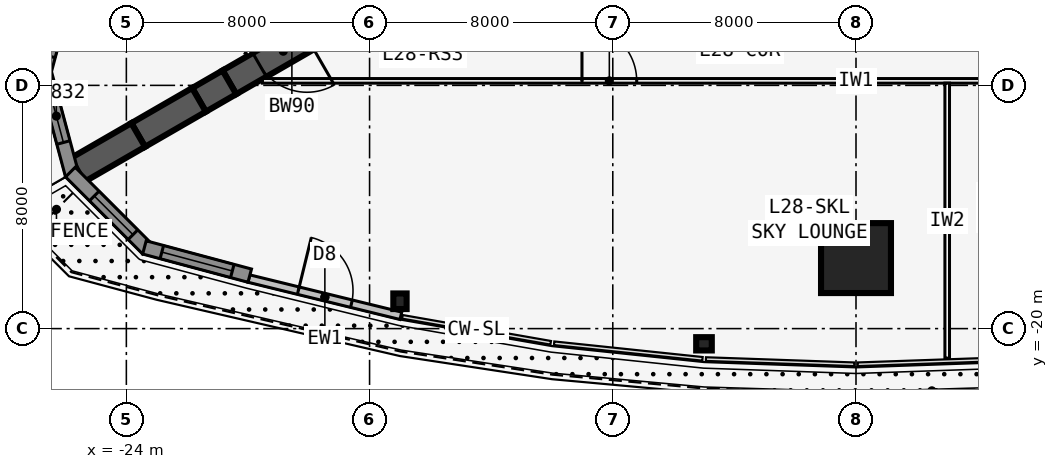
"""IFC4 building model, lengths in metres.
Left out: names, types, materials, properties, quantities, classifications, styles, units other than length and angle.
Written with IfcOpenShell. Run it as: python <this file> out.ifc"""

import sys

from ifc_helpers import new_model, si_unit, direction, frame, frame_2d, origin, origin_2d, place, context, subcontext, project, spatial, polyline, rectangle, i_section, outline, extrude, element, fill, save


model = new_model("IFC4")
c1 = context("Model", 3, precision=1e-05, world=origin(), true_north=direction((0.0, 1.0)))
c2 = subcontext(c1, "Body", "Model", "MODEL_VIEW")
j1 = project(units=[si_unit("LENGTHUNIT", "METRE"), si_unit("PLANEANGLEUNIT", "RADIAN")], contexts=[c1])
p1 = place(None, origin())
s1 = spatial("IfcSite", under=j1, at=p1, CompositionType="ELEMENT")
p2 = place(p1, origin())
s2 = spatial("IfcBuilding", under=s1, at=p2, CompositionType="ELEMENT")
p3 = place(p2, frame((0.0, 0.0, 109.7)))
s3 = spatial("IfcBuildingStorey", under=s2, at=p3, CompositionType="ELEMENT", Elevation=109.7)
p4 = place(p3, frame((-16.5, -9.526, 0.0), z_axis=(0.0, 0.0, 1.0), x_axis=(-0.866031398331, -0.499989616998, 0.0)))
e1 = element("IfcWall", 1, at=p4, inside=s3, PredefinedType="SHEAR", context=c2, shape_type="SweptSolid", body=[
    extrude(rectangle(XDim=4.746, YDim=0.9, at=frame_2d((2.373, 0.0))), origin(), (0.0, 0.0, 1.0), 5.0),
])
p5 = place(p4, frame((1.8, 0.0, 0.0)))
e2 = element("IfcOpeningElement", 2, at=p5, cuts=e1, PredefinedType="OPENING", context=c2, shape_type="SweptSolid", body=[
    extrude(rectangle(XDim=1.8, YDim=2.13, at=frame_2d((0.9, 1.065))), frame((0.0, 0.46, 0.0), z_axis=(0.0, -1.0, 0.0), x_axis=(1.0, 0.0, 0.0)), (0.0, 0.0, 1.0), 0.92),
])
p6 = place(p3, frame((-20.61, -11.899, 0.0), z_axis=(0.0, 0.0, 1.0), x_axis=(-0.866009537788, -0.500027479704, 0.0)))
e3 = element("IfcWall", 3, at=p6, inside=s3, PredefinedType="SHEAR", context=c2, shape_type="SweptSolid", body=[
    extrude(rectangle(XDim=1.155, YDim=0.9, at=frame_2d((0.577, 0.0))), origin(), (0.0, 0.0, 1.0), 5.0),
])
for number, where, z_axis, x_axis in (
    (4, (-21.61, -12.477, 0.0), (0.0, 0.0, 1.0), (-0.866, -0.5, 0.0)),
    (5, (-23.61, -13.631, 0.0), (0.0, 0.0, 1.0), (-0.866, -0.5, 0.0)),
):
    element("IfcWall", number, at=place(p3, frame(where, z_axis=z_axis, x_axis=x_axis)), inside=s3, PredefinedType="SHEAR", context=c2, shape_type="SweptSolid", body=[
        extrude(rectangle(XDim=2.309, YDim=0.9, at=frame_2d((1.155, 0.0))), origin(), (0.0, 0.0, 1.0), 5.0),
    ])
for number, where, z_axis, x_axis in (
    (6, (-15.0, -19.1, 0.0), (0.0, 0.0, 1.0), (1.0, 0.0, 0.0)),
    (7, (-5.0, -20.5, 0.0), (0.0, 0.0, 1.0), (0.0, -1.0, 0.0)),
):
    element("IfcColumn", number, at=place(p3, frame(where, z_axis=z_axis, x_axis=x_axis)), inside=s3, PredefinedType="COLUMN", context=c2, shape_type="SweptSolid", body=[
        extrude(i_section(OverallWidth=0.437, OverallDepth=0.513, WebThickness=0.061, FlangeThickness=0.097, at=origin_2d()), origin(), (0.0, 0.0, 1.0), 5.0),
    ])
p7 = place(p3, frame((0.0, -17.68, 0.0), z_axis=(0.0, 0.0, 1.0), x_axis=(0.0, -1.0, 0.0)))
e8 = element("IfcColumn", 8, at=p7, inside=s3, PredefinedType="COLUMN", context=c2, shape_type="SweptSolid", body=[
    extrude(rectangle(XDim=2.3, YDim=2.3, at=origin_2d()), origin(), (0.0, 0.0, 1.0), 5.0),
])
p8 = place(p3, frame((-19.97, -18.354, 0.0), z_axis=(0.0, 0.0, 1.0), x_axis=(0.971270024053, -0.237980126011, 0.0)))
e9 = element("IfcWall", 9, at=p8, inside=s3, PredefinedType="STANDARD", context=c2, shape_type="SweptSolid", body=[
    extrude(rectangle(XDim=5.148, YDim=0.25, at=frame_2d((2.574, 0.0))), origin(), (0.0, 0.0, 1.0), 4.835),
])
p9 = place(p8, frame((1.674, 0.0, 0.0)))
e10 = element("IfcOpeningElement", 10, at=p9, cuts=e9, PredefinedType="OPENING", context=c2, shape_type="SweptSolid", body=[
    extrude(rectangle(XDim=1.8, YDim=2.4, at=frame_2d((0.9, 1.2))), frame((0.0, 0.135, 0.0), z_axis=(0.0, -1.0, 0.0), x_axis=(1.0, 0.0, 0.0)), (0.0, 0.0, 1.0), 0.27),
])
p10 = place(p3, frame((-25.783, -8.141, 0.0), z_axis=(0.0, 0.0, 1.0), x_axis=(-0.258823421857, -0.965924653531, 0.0)))
e11 = element("IfcWall", 11, at=p10, inside=s3, PredefinedType="SOLIDWALL", context=c2, shape_type="SweptSolid", body=[
    extrude(rectangle(XDim=3.586, YDim=0.45, at=frame_2d((1.793, 0.0))), origin(), (0.0, 0.0, 1.0), 4.835),
])
p11 = place(p10, frame((0.593, 0.0, 0.6)))
e12 = element("IfcOpeningElement", 12, at=p11, cuts=e11, PredefinedType="OPENING", context=c2, shape_type="SweptSolid", body=[
    extrude(rectangle(XDim=2.4, YDim=3.2, at=frame_2d((1.2, 1.6))), frame((0.0, 0.235, 0.0), z_axis=(0.0, -1.0, 0.0), x_axis=(1.0, 0.0, 0.0)), (0.0, 0.0, 1.0), 0.47),
])
p12 = place(p3, frame((-26.711, -11.489, 0.0), z_axis=(0.0, 0.0, 1.0), x_axis=(0.258823421857, -0.965924653531, 0.0)))
e13 = element("IfcWall", 13, at=p12, inside=s3, PredefinedType="SOLIDWALL", context=c2, shape_type="SweptSolid", body=[
    extrude(outline(polyline([(3.586, 0.225), (3.527, 0.225), (3.035, 0.093), (3.0, 0.225), (0.0, 0.225), (0.0, -0.225), (3.586, -0.225), (3.586, 0.225)])), origin(), (0.0, 0.0, 1.0), 4.835),
])
p13 = place(p12, frame((0.675, 0.0, 0.6)))
e14 = element("IfcOpeningElement", 14, at=p13, cuts=e13, PredefinedType="OPENING", context=c2, shape_type="SweptSolid", body=[
    extrude(rectangle(XDim=1.8, YDim=3.2, at=frame_2d((0.9, 1.6))), frame((0.0, 0.235, 0.0), z_axis=(0.0, -1.0, 0.0), x_axis=(1.0, 0.0, 0.0)), (0.0, 0.0, 1.0), 0.47),
])
p14 = place(p3, frame((-25.841, -14.852, 0.0), z_axis=(0.0, 0.0, 1.0), x_axis=(0.707106781187, -0.707106781187, 0.0)))
e15 = element("IfcWall", 15, at=p14, inside=s3, PredefinedType="SOLIDWALL", context=c2, shape_type="SweptSolid", body=[
    extrude(outline(polyline([(3.586, 0.225), (0.586, 0.225), (0.551, 0.093), (0.059, 0.225), (0.0, 0.225), (0.0, -0.225), (3.586, -0.225), (3.586, 0.225)])), origin(), (0.0, 0.0, 1.0), 4.835),
])
p15 = place(p14, frame((1.111, 0.0, 0.6)))
e16 = element("IfcOpeningElement", 16, at=p15, cuts=e15, PredefinedType="OPENING", context=c2, shape_type="SweptSolid", body=[
    extrude(rectangle(XDim=1.8, YDim=3.2, at=frame_2d((0.9, 1.6))), frame((0.0, 0.235, 0.0), z_axis=(0.0, -1.0, 0.0), x_axis=(1.0, 0.0, 0.0)), (0.0, 0.0, 1.0), 0.47),
])
p16 = place(p3, frame((-23.406, -17.33, 0.0), z_axis=(0.0, 0.0, 1.0), x_axis=(0.965924653531, -0.258823421857, 0.0)))
e17 = element("IfcWall", 17, at=p16, inside=s3, PredefinedType="SOLIDWALL", context=c2, shape_type="SweptSolid", body=[
    extrude(rectangle(XDim=3.586, YDim=0.45, at=frame_2d((1.793, 0.0))), origin(), (0.0, 0.0, 1.0), 4.835),
])
p17 = place(p16, frame((0.593, 0.0, 0.6)))
e18 = element("IfcOpeningElement", 18, at=p17, cuts=e17, PredefinedType="OPENING", context=c2, shape_type="SweptSolid", body=[
    extrude(rectangle(XDim=2.4, YDim=3.2, at=frame_2d((1.2, 1.6))), frame((0.0, 0.235, 0.0), z_axis=(0.0, -1.0, 0.0), x_axis=(1.0, 0.0, 0.0)), (0.0, 0.0, 1.0), 0.47),
])
p18 = place(p3, frame((-19.527, -11.851, 0.0), z_axis=(0.0, 0.0, 1.0), x_axis=(1.0, 0.0, 0.0)))
e19 = element("IfcWall", 19, at=p18, inside=s3, PredefinedType="PARTITIONING", context=c2, shape_type="SweptSolid", body=[
    extrude(rectangle(XDim=39.054, YDim=0.15, at=frame_2d((19.527, 0.0))), origin(), (0.0, 0.0, 1.0), 4.835),
])
p19 = place(p18, frame((10.513, 0.0, 0.0)))
e20 = element("IfcOpeningElement", 20, at=p19, cuts=e19, PredefinedType="OPENING", context=c2, shape_type="SweptSolid", body=[
    extrude(rectangle(XDim=1.8, YDim=2.13, at=frame_2d((0.9, 1.065))), frame((0.0, 0.085, 0.0), z_axis=(0.0, -1.0, 0.0), x_axis=(1.0, 0.0, 0.0)), (0.0, 0.0, 1.0), 0.17),
])
p20 = place(p18, frame((24.027, 0.0, 0.0)))
e21 = element("IfcOpeningElement", 21, at=p20, cuts=e19, PredefinedType="OPENING", context=c2, shape_type="SweptSolid", body=[
    extrude(rectangle(XDim=1.0, YDim=2.13, at=frame_2d((0.5, 1.065))), frame((0.0, 0.085, 0.0), z_axis=(0.0, -1.0, 0.0), x_axis=(1.0, 0.0, 0.0)), (0.0, 0.0, 1.0), 0.17),
])
p21 = place(p18, frame((31.74, 0.0, 0.0)))
e22 = element("IfcOpeningElement", 22, at=p21, cuts=e19, PredefinedType="OPENING", context=c2, shape_type="SweptSolid", body=[
    extrude(rectangle(XDim=1.8, YDim=2.13, at=frame_2d((0.9, 1.065))), frame((0.0, 0.085, 0.0), z_axis=(0.0, -1.0, 0.0), x_axis=(1.0, 0.0, 0.0)), (0.0, 0.0, 1.0), 0.17),
])
p22 = place(p3, frame((3.0, -11.926, 0.0), z_axis=(0.0, 0.0, 1.0), x_axis=(0.0, -1.0, 0.0)))
e23 = element("IfcWall", 23, at=p22, inside=s3, PredefinedType="PARTITIONING", context=c2, shape_type="SweptSolid", body=[
    extrude(rectangle(XDim=9.046, YDim=0.15, at=frame_2d((4.523, 0.0))), origin(), (0.0, 0.0, 1.0), 4.835),
])
p23 = place(p3, frame((20.027, -10.985, 0.0), z_axis=(0.0, 0.0, 1.0), x_axis=(-0.500001677587, 0.866024435227, 0.0)))
e24 = element("IfcWall", 24, at=p23, inside=s3, PredefinedType="PARTITIONING", context=c2, shape_type="SweptSolid", body=[
    extrude(rectangle(XDim=39.054, YDim=0.15, at=frame_2d((19.527, 0.0))), origin(), (0.0, 0.0, 1.0), 4.835),
])
p24 = place(p23, frame((6.513, 0.0, 0.0)))
e25 = element("IfcOpeningElement", 25, at=p24, cuts=e24, PredefinedType="OPENING", context=c2, shape_type="SweptSolid", body=[
    extrude(rectangle(XDim=1.8, YDim=2.13, at=frame_2d((0.9, 1.065))), frame((0.0, 0.085, 0.0), z_axis=(0.0, -1.0, 0.0), x_axis=(1.0, 0.0, 0.0)), (0.0, 0.0, 1.0), 0.17),
])
p25 = place(p23, frame((16.527, 0.0, 0.0)))
e26 = element("IfcOpeningElement", 26, at=p25, cuts=e24, PredefinedType="OPENING", context=c2, shape_type="SweptSolid", body=[
    extrude(rectangle(XDim=1.0, YDim=2.13, at=frame_2d((0.5, 1.065))), frame((0.0, 0.085, 0.0), z_axis=(0.0, -1.0, 0.0), x_axis=(1.0, 0.0, 0.0)), (0.0, 0.0, 1.0), 0.17),
])
p26 = place(p23, frame((21.527, 0.0, 0.0)))
e27 = element("IfcOpeningElement", 27, at=p26, cuts=e24, PredefinedType="OPENING", context=c2, shape_type="SweptSolid", body=[
    extrude(rectangle(XDim=1.0, YDim=2.13, at=frame_2d((0.5, 1.065))), frame((0.0, 0.085, 0.0), z_axis=(0.0, -1.0, 0.0), x_axis=(1.0, 0.0, 0.0)), (0.0, 0.0, 1.0), 0.17),
])
p27 = place(p23, frame((25.527, 0.0, 0.0)))
e28 = element("IfcOpeningElement", 28, at=p27, cuts=e24, PredefinedType="OPENING", context=c2, shape_type="SweptSolid", body=[
    extrude(rectangle(XDim=1.0, YDim=2.13, at=frame_2d((0.5, 1.065))), frame((0.0, 0.085, 0.0), z_axis=(0.0, -1.0, 0.0), x_axis=(1.0, 0.0, 0.0)), (0.0, 0.0, 1.0), 0.17),
])
p28 = place(p23, frame((32.24, 0.0, 0.0)))
e29 = element("IfcOpeningElement", 29, at=p28, cuts=e24, PredefinedType="OPENING", context=c2, shape_type="SweptSolid", body=[
    extrude(rectangle(XDim=1.8, YDim=2.13, at=frame_2d((0.9, 1.065))), frame((0.0, 0.085, 0.0), z_axis=(0.0, -1.0, 0.0), x_axis=(1.0, 0.0, 0.0)), (0.0, 0.0, 1.0), 0.17),
])
p29 = place(p3, frame((-0.5, 22.836, 0.0), z_axis=(0.0, 0.0, 1.0), x_axis=(-0.500001677587, -0.866024435227, 0.0)))
e30 = element("IfcWall", 30, at=p29, inside=s3, PredefinedType="PARTITIONING", context=c2, shape_type="SweptSolid", body=[
    extrude(rectangle(XDim=39.054, YDim=0.15, at=frame_2d((19.527, 0.0))), origin(), (0.0, 0.0, 1.0), 4.835),
])
p30 = place(p29, frame((6.414, 0.0, 0.0)))
e31 = element("IfcOpeningElement", 31, at=p30, cuts=e30, PredefinedType="OPENING", context=c2, shape_type="SweptSolid", body=[
    extrude(rectangle(XDim=1.0, YDim=2.13, at=frame_2d((0.5, 1.065))), frame((0.0, 0.085, 0.0), z_axis=(0.0, -1.0, 0.0), x_axis=(1.0, 0.0, 0.0)), (0.0, 0.0, 1.0), 0.17),
])
p31 = place(p29, frame((15.527, 0.0, 0.0)))
e32 = element("IfcOpeningElement", 32, at=p31, cuts=e30, PredefinedType="OPENING", context=c2, shape_type="SweptSolid", body=[
    extrude(rectangle(XDim=1.0, YDim=2.13, at=frame_2d((0.5, 1.065))), frame((0.0, 0.085, 0.0), z_axis=(0.0, -1.0, 0.0), x_axis=(1.0, 0.0, 0.0)), (0.0, 0.0, 1.0), 0.17),
])
p32 = place(p29, frame((21.277, 0.0, 0.0)))
e33 = element("IfcOpeningElement", 33, at=p32, cuts=e30, PredefinedType="OPENING", context=c2, shape_type="SweptSolid", body=[
    extrude(rectangle(XDim=1.0, YDim=2.13, at=frame_2d((0.5, 1.065))), frame((0.0, 0.085, 0.0), z_axis=(0.0, -1.0, 0.0), x_axis=(1.0, 0.0, 0.0)), (0.0, 0.0, 1.0), 0.17),
])
p33 = place(p29, frame((31.39, 0.0, 0.0)))
e34 = element("IfcOpeningElement", 34, at=p33, cuts=e30, PredefinedType="OPENING", context=c2, shape_type="SweptSolid", body=[
    extrude(rectangle(XDim=1.0, YDim=2.13, at=frame_2d((0.5, 1.065))), frame((0.0, 0.085, 0.0), z_axis=(0.0, -1.0, 0.0), x_axis=(1.0, 0.0, 0.0)), (0.0, 0.0, 1.0), 0.17),
])
p34 = place(p9, origin())
e35 = element("IfcDoor", 35, at=p34, inside=s3, OperationType="DOUBLE_DOOR_SINGLE_SWING", PredefinedType="DOOR", context=c2, shape_type="SweptSolid", body=[
    extrude(rectangle(XDim=1.8, YDim=2.4, at=frame_2d((0.9, 1.2))), frame((0.0, 0.025, 0.0), z_axis=(0.0, -1.0, 0.0), x_axis=(1.0, 0.0, 0.0)), (0.0, 0.0, 1.0), 0.05),
])
fill(e10, e35)
p35 = place(p11, origin())
e36 = element("IfcWindow", 36, at=p35, inside=s3, PartitioningType="SINGLE_PANEL", PredefinedType="WINDOW", context=c2, shape_type="SweptSolid", body=[
    extrude(rectangle(XDim=2.4, YDim=3.2, at=frame_2d((1.2, 1.6))), frame((0.0, 0.03, 0.0), z_axis=(0.0, -1.0, 0.0), x_axis=(1.0, 0.0, 0.0)), (0.0, 0.0, 1.0), 0.06),
])
fill(e12, e36)
p36 = place(p13, origin())
e37 = element("IfcWindow", 37, at=p36, inside=s3, PartitioningType="SINGLE_PANEL", PredefinedType="WINDOW", context=c2, shape_type="SweptSolid", body=[
    extrude(rectangle(XDim=1.8, YDim=3.2, at=frame_2d((0.9, 1.6))), frame((0.0, 0.03, 0.0), z_axis=(0.0, -1.0, 0.0), x_axis=(1.0, 0.0, 0.0)), (0.0, 0.0, 1.0), 0.06),
])
fill(e14, e37)
p37 = place(p15, origin())
e38 = element("IfcWindow", 38, at=p37, inside=s3, PartitioningType="SINGLE_PANEL", PredefinedType="WINDOW", context=c2, shape_type="SweptSolid", body=[
    extrude(rectangle(XDim=1.8, YDim=3.2, at=frame_2d((0.9, 1.6))), frame((0.0, 0.03, 0.0), z_axis=(0.0, -1.0, 0.0), x_axis=(1.0, 0.0, 0.0)), (0.0, 0.0, 1.0), 0.06),
])
fill(e16, e38)
p38 = place(p17, origin())
e39 = element("IfcWindow", 39, at=p38, inside=s3, PartitioningType="SINGLE_PANEL", PredefinedType="WINDOW", context=c2, shape_type="SweptSolid", body=[
    extrude(rectangle(XDim=2.4, YDim=3.2, at=frame_2d((1.2, 1.6))), frame((0.0, 0.03, 0.0), z_axis=(0.0, -1.0, 0.0), x_axis=(1.0, 0.0, 0.0)), (0.0, 0.0, 1.0), 0.06),
])
fill(e18, e39)
p39 = place(p19, origin())
e40 = element("IfcDoor", 40, at=p39, inside=s3, OperationType="DOUBLE_DOOR_SINGLE_SWING", PredefinedType="DOOR", context=c2, shape_type="SweptSolid", body=[
    extrude(rectangle(XDim=1.8, YDim=2.13, at=frame_2d((0.9, 1.065))), frame((0.0, 0.025, 0.0), z_axis=(0.0, -1.0, 0.0), x_axis=(1.0, 0.0, 0.0)), (0.0, 0.0, 1.0), 0.05),
])
fill(e20, e40)
p40 = place(p5, origin())
e41 = element("IfcDoor", 41, at=p40, inside=s3, OperationType="DOUBLE_DOOR_DOUBLE_SWING", PredefinedType="DOOR", context=c2, shape_type="SweptSolid", body=[
    extrude(rectangle(XDim=1.8, YDim=2.13, at=frame_2d((0.9, 1.065))), frame((0.0, 0.025, 0.0), z_axis=(0.0, -1.0, 0.0), x_axis=(1.0, 0.0, 0.0)), (0.0, 0.0, 1.0), 0.05),
])
fill(e2, e41)
save(model, sys.argv[1])
